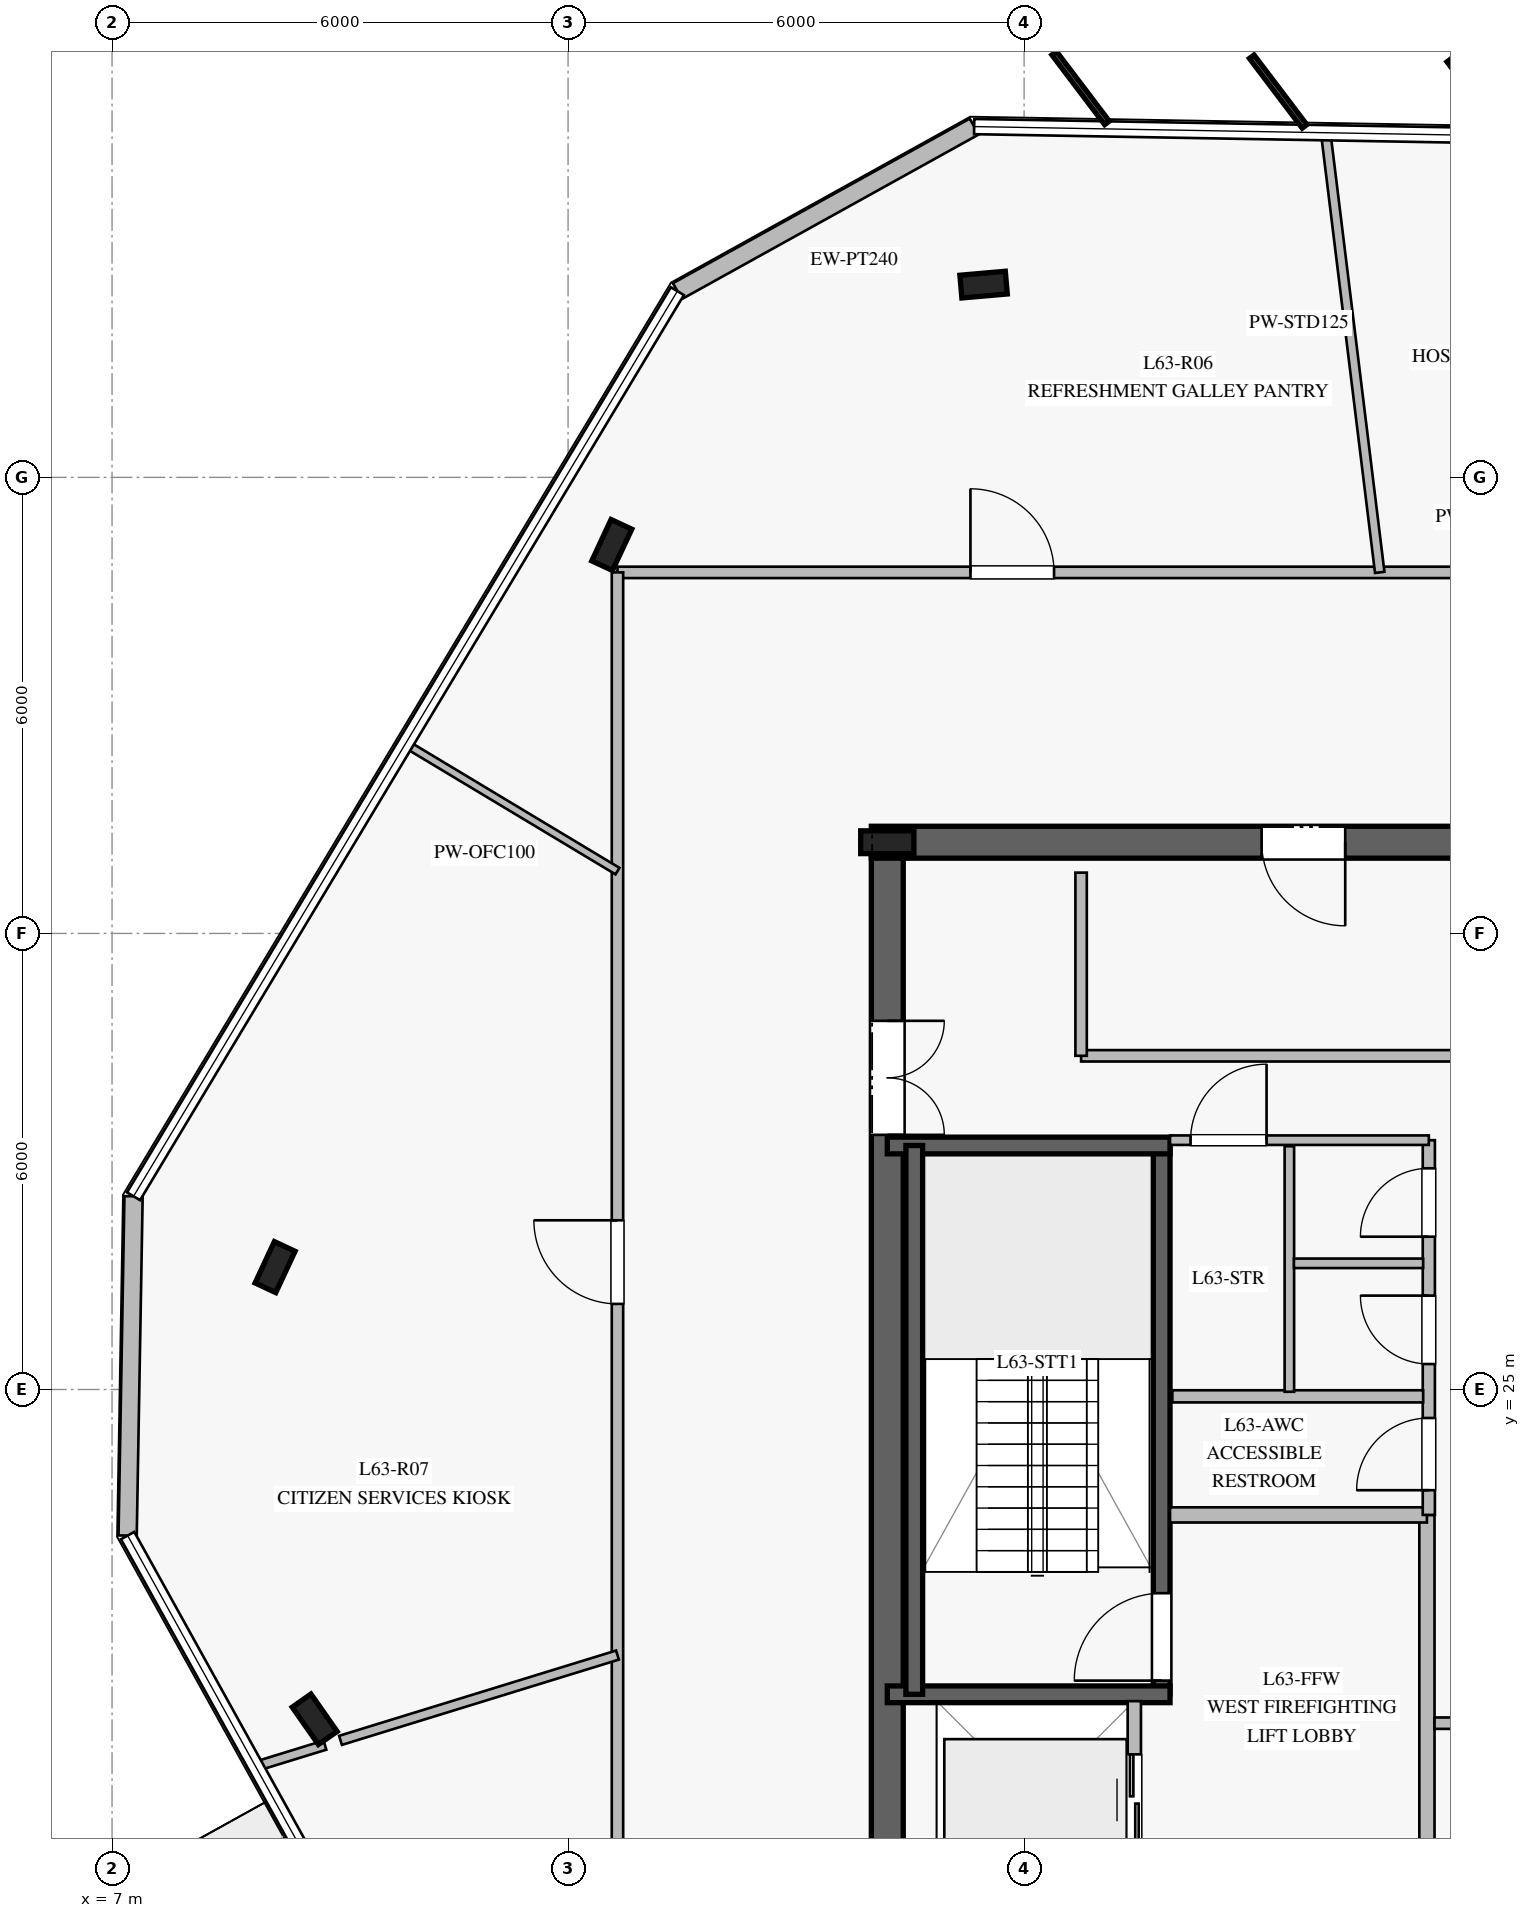
"""IFC4 building model, lengths in metres.
Left out: names, types, materials, properties, quantities, classifications, styles, units other than length and angle.
Written with IfcOpenShell. Run it as: python <this file> out.ifc"""

import sys

from ifc_helpers import new_model, si_unit, direction, frame, frame_2d, origin, origin_2d, place, context, subcontext, project, spatial, rectangle, i_section, extrude, element, fill, save


model = new_model("IFC4")
c1 = context("Model", 3, precision=1e-05, world=origin(), true_north=direction((0.0, 1.0)))
c2 = subcontext(c1, "Body", "Model", "MODEL_VIEW")
j1 = project(units=[si_unit("LENGTHUNIT", "METRE"), si_unit("PLANEANGLEUNIT", "RADIAN")], contexts=[c1])
p1 = place(None, origin())
s1 = spatial("IfcSite", under=j1, at=p1, CompositionType="ELEMENT")
p2 = place(p1, origin())
s2 = spatial("IfcBuilding", under=s1, at=p2, CompositionType="ELEMENT")
p3 = place(p2, frame((0.0, 0.0, 262.2)))
s3 = spatial("IfcBuildingStorey", under=s2, at=p3, CompositionType="ELEMENT", Elevation=262.2)
p4 = place(p3, frame((33.01, 32.2, 0.0), z_axis=(0.0, 0.0, 1.0), x_axis=(-1.0, 0.0, 0.0)))
e1 = element("IfcWall", 1, at=p4, inside=s3, PredefinedType="SHEAR", context=c2, shape_type="SweptSolid", body=[
    extrude(rectangle(XDim=16.02, YDim=0.42, at=frame_2d((8.01, 0.0))), origin(), (0.0, 0.0, 1.0), 3.78),
])
p5 = place(p4, frame((4.96, 0.0, 0.0)))
e2 = element("IfcOpeningElement", 2, at=p5, cuts=e1, PredefinedType="OPENING", context=c2, shape_type="SweptSolid", body=[
    extrude(rectangle(XDim=1.2, YDim=2.25, at=frame_2d((0.6, 1.125))), frame((0.0, 0.22, 0.0), z_axis=(0.0, -1.0, 0.0), x_axis=(1.0, 0.0, 0.0)), (0.0, 0.0, 1.0), 0.44),
])
p6 = place(p4, frame((9.785, 0.0, 0.0)))
e3 = element("IfcOpeningElement", 3, at=p6, cuts=e1, PredefinedType="OPENING", context=c2, shape_type="SweptSolid", body=[
    extrude(rectangle(XDim=1.1, YDim=2.2, at=frame_2d((0.55, 1.1))), frame((0.0, 0.22, 0.0), z_axis=(0.0, -1.0, 0.0), x_axis=(1.0, 0.0, 0.0)), (0.0, 0.0, 1.0), 0.44),
])
p7 = place(p3, frame((17.2, 31.99, 0.0), z_axis=(0.0, 0.0, 1.0), x_axis=(0.0, -1.0, 0.0)))
e4 = element("IfcWall", 4, at=p7, inside=s3, PredefinedType="SHEAR", context=c2, shape_type="SweptSolid", body=[
    extrude(rectangle(XDim=13.98, YDim=0.42, at=frame_2d((6.99, 0.0))), origin(), (0.0, 0.0, 1.0), 3.78),
])
p8 = place(p7, frame((2.14, 0.0, 0.0)))
e5 = element("IfcOpeningElement", 5, at=p8, cuts=e4, PredefinedType="OPENING", context=c2, shape_type="SweptSolid", body=[
    extrude(rectangle(XDim=1.5, YDim=2.2, at=frame_2d((0.75, 1.1))), frame((0.0, 0.22, 0.0), z_axis=(0.0, -1.0, 0.0), x_axis=(1.0, 0.0, 0.0)), (0.0, 0.0, 1.0), 0.44),
])
p9 = place(p3, frame((17.2, 32.2, 0.0), z_axis=(0.0, 0.0, 1.0), x_axis=(1.0, 0.0, 0.0)))
e6 = element("IfcColumn", 6, at=p9, inside=s3, PredefinedType="COLUMN", context=c2, shape_type="SweptSolid", body=[
    extrude(i_section(OverallWidth=0.3, OverallDepth=0.7, WebThickness=0.017, FlangeThickness=0.032, at=origin_2d()), origin(), (0.0, 0.0, 1.0), 4.0),
])
p10 = place(p3, frame((20.81, 20.99, 0.0), z_axis=(0.0, 0.0, 1.0), x_axis=(0.0, 1.0, 0.0)))
e7 = element("IfcWall", 7, at=p10, inside=s3, PredefinedType="SOLIDWALL", context=c2, shape_type="SweptSolid", body=[
    extrude(rectangle(XDim=7.22, YDim=0.22, at=frame_2d((3.61, 0.0))), origin(), (0.0, 0.0, 1.0), 3.78),
])
p11 = place(p10, frame((0.18, 0.0, 0.0)))
e8 = element("IfcOpeningElement", 8, at=p11, cuts=e7, PredefinedType="OPENING", context=c2, shape_type="SweptSolid", body=[
    extrude(rectangle(XDim=1.15, YDim=2.2, at=frame_2d((0.575, 1.1))), frame((0.0, 0.12, 0.0), z_axis=(0.0, -1.0, 0.0), x_axis=(1.0, 0.0, 0.0)), (0.0, 0.0, 1.0), 0.24),
])
for number, where, z_axis, x_axis in (
    (9, (17.2, 20.99, 0.0), (0.0, 0.0, 1.0), (1.0, 0.0, 0.0)),
    (10, (17.2, 28.21, 0.0), (0.0, 0.0, 1.0), (1.0, 0.0, 0.0)),
):
    element("IfcWall", number, at=place(p3, frame(where, z_axis=z_axis, x_axis=x_axis)), inside=s3, PredefinedType="SOLIDWALL", context=c2, shape_type="SweptSolid", body=[
        extrude(rectangle(XDim=3.72, YDim=0.22, at=frame_2d((1.86, 0.0))), origin(), (0.0, 0.0, 1.0), 3.78),
    ])
p12 = place(p3, frame((17.555, 28.21, 0.0), z_axis=(0.0, 0.0, 1.0), x_axis=(0.0, -1.0, 0.0)))
e11 = element("IfcWall", 11, at=p12, inside=s3, PredefinedType="SOLIDWALL", context=c2, shape_type="SweptSolid", body=[
    extrude(rectangle(XDim=7.22, YDim=0.22, at=frame_2d((3.61, 0.0))), origin(), (0.0, 0.0, 1.0), 3.78),
])
for number, where, z_axis, x_axis in (
    (12, (18.467, 39.536, 0.0), (0.0, 0.0, 1.0), (0.996, 0.087, 0.0)),
    (13, (13.575, 36.11, 0.0), (0.0, 0.0, 1.0), (0.423, 0.906, 0.0)),
    (14, (9.145, 26.61, 0.0), (0.0, 0.0, 1.0), (0.423, 0.906, 0.0)),
    (15, (9.666, 20.661, 0.0), (0.0, 0.0, 1.0), (-0.574, 0.819, 0.0)),
):
    element("IfcColumn", number, at=place(p3, frame(where, z_axis=z_axis, x_axis=x_axis)), inside=s3, PredefinedType="COLUMN", context=c2, shape_type="SweptSolid", body=[
        extrude(i_section(OverallWidth=0.3, OverallDepth=0.6, WebThickness=0.015, FlangeThickness=0.03, at=origin_2d()), origin(), (0.0, 0.0, 1.0), 4.0),
    ])
p13 = place(p3, frame((18.343, 41.615, 0.0), z_axis=(0.0, 0.0, 1.0), x_axis=(-0.874577351509, -0.484886023956, 0.0)))
e16 = element("IfcWall", 16, at=p13, inside=s3, PredefinedType="STANDARD", context=c2, shape_type="SweptSolid", body=[
    extrude(rectangle(XDim=4.465, YDim=0.24, at=frame_2d((2.232, 0.0))), origin(), (0.0, 0.0, 1.0), 3.78),
])
p14 = place(p3, frame((7.283, 27.542, 0.0), z_axis=(0.0, 0.0, 1.0), x_axis=(-0.017443339635, -0.999847853377, 0.0)))
e17 = element("IfcWall", 17, at=p14, inside=s3, PredefinedType="STANDARD", context=c2, shape_type="SweptSolid", body=[
    extrude(rectangle(XDim=4.465, YDim=0.24, at=frame_2d((2.232, 0.0))), origin(), (0.0, 0.0, 1.0), 3.78),
])
p15 = place(p3, frame((24.3, 18.2, 0.0), z_axis=(0.0, 0.0, 1.0), x_axis=(0.0, 1.0, 0.0)))
e18 = element("IfcWall", 18, at=p15, inside=s3, PredefinedType="PARTITIONING", context=c2, shape_type="SweptSolid", body=[
    extrude(rectangle(XDim=5.15, YDim=0.2, at=frame_2d((2.575, 0.0))), origin(), (0.0, 0.0, 1.0), 3.78),
])
p16 = place(p3, frame((20.92, 23.35, 0.0), z_axis=(0.0, 0.0, 1.0), x_axis=(1.0, 0.0, 0.0)))
e19 = element("IfcWall", 19, at=p16, inside=s3, PredefinedType="PARTITIONING", context=c2, shape_type="SweptSolid", body=[
    extrude(rectangle(XDim=3.38, YDim=0.2, at=frame_2d((1.69, 0.0))), origin(), (0.0, 0.0, 1.0), 3.78),
])
p17 = place(p3, frame((24.325, 23.35, 0.0), z_axis=(0.0, 0.0, 1.0), x_axis=(0.0, 1.0, 0.0)))
e20 = element("IfcWall", 20, at=p17, inside=s3, PredefinedType="PLUMBINGWALL", context=c2, shape_type="SweptSolid", body=[
    extrude(rectangle(XDim=4.93, YDim=0.16, at=frame_2d((2.465, 0.0))), origin(), (0.0, 0.0, 1.0), 3.78),
])
p18 = place(p17, frame((0.325, 0.0, 0.0)))
e21 = element("IfcOpeningElement", 21, at=p18, cuts=e20, PredefinedType="OPENING", context=c2, shape_type="SweptSolid", body=[
    extrude(rectangle(XDim=0.95, YDim=2.1, at=frame_2d((0.475, 1.05))), frame((0.0, 0.09, 0.0), z_axis=(0.0, -1.0, 0.0), x_axis=(1.0, 0.0, 0.0)), (0.0, 0.0, 1.0), 0.18),
])
p19 = place(p17, frame((1.985, 0.0, 0.0)))
e22 = element("IfcOpeningElement", 22, at=p19, cuts=e20, PredefinedType="OPENING", context=c2, shape_type="SweptSolid", body=[
    extrude(rectangle(XDim=0.9, YDim=2.1, at=frame_2d((0.45, 1.05))), frame((0.0, 0.09, 0.0), z_axis=(0.0, -1.0, 0.0), x_axis=(1.0, 0.0, 0.0)), (0.0, 0.0, 1.0), 0.18),
])
p20 = place(p17, frame((3.66, 0.0, 0.0)))
e23 = element("IfcOpeningElement", 23, at=p20, cuts=e20, PredefinedType="OPENING", context=c2, shape_type="SweptSolid", body=[
    extrude(rectangle(XDim=0.9, YDim=2.1, at=frame_2d((0.45, 1.05))), frame((0.0, 0.09, 0.0), z_axis=(0.0, -1.0, 0.0), x_axis=(1.0, 0.0, 0.0)), (0.0, 0.0, 1.0), 0.18),
])
p21 = place(p3, frame((20.92, 28.28, 0.0), z_axis=(0.0, 0.0, 1.0), x_axis=(1.0, 0.0, 0.0)))
e24 = element("IfcWall", 24, at=p21, inside=s3, PredefinedType="PARTITIONING", context=c2, shape_type="SweptSolid", body=[
    extrude(rectangle(XDim=3.405, YDim=0.125, at=frame_2d((1.703, 0.0))), origin(), (0.0, 0.0, 1.0), 3.78),
])
p22 = place(p21, frame((0.27, 0.0, 0.0)))
e25 = element("IfcOpeningElement", 25, at=p22, cuts=e24, PredefinedType="OPENING", context=c2, shape_type="SweptSolid", body=[
    extrude(rectangle(XDim=1.0, YDim=2.15, at=frame_2d((0.5, 1.075))), frame((0.0, 0.073, 0.0), z_axis=(0.0, -1.0, 0.0), x_axis=(1.0, 0.0, 0.0)), (0.0, 0.0, 1.0), 0.145),
])
p23 = place(p3, frame((20.95, 24.91, 0.0), z_axis=(0.0, 0.0, 1.0), x_axis=(1.0, 0.0, 0.0)))
e26 = element("IfcWall", 26, at=p23, inside=s3, PredefinedType="PLUMBINGWALL", context=c2, shape_type="SweptSolid", body=[
    extrude(rectangle(XDim=3.3, YDim=0.16, at=frame_2d((1.65, 0.0))), origin(), (0.0, 0.0, 1.0), 3.78),
])
p24 = place(p3, frame((22.49, 24.97, 0.0), z_axis=(0.0, 0.0, 1.0), x_axis=(0.0, 1.0, 0.0)))
e27 = element("IfcWall", 27, at=p24, inside=s3, PredefinedType="PARTITIONING", context=c2, shape_type="SweptSolid", body=[
    extrude(rectangle(XDim=3.23, YDim=0.125, at=frame_2d((1.615, 0.0))), origin(), (0.0, 0.0, 1.0), 3.78),
])
p25 = place(p3, frame((22.55, 26.66, 0.0), z_axis=(0.0, 0.0, 1.0), x_axis=(1.0, 0.0, 0.0)))
e28 = element("IfcWall", 28, at=p25, inside=s3, PredefinedType="PARTITIONING", context=c2, shape_type="SweptSolid", body=[
    extrude(rectangle(XDim=1.7, YDim=0.125, at=frame_2d((0.85, 0.0))), origin(), (0.0, 0.0, 1.0), 3.78),
])
p26 = place(p3, frame((24.4, 20.61, 0.0), z_axis=(0.0, 0.0, 1.0), x_axis=(1.0, 0.0, 0.0)))
e29 = element("IfcWall", 29, at=p26, inside=s3, PredefinedType="PARTITIONING", context=c2, shape_type="SweptSolid", body=[
    extrude(rectangle(XDim=5.9, YDim=0.15, at=frame_2d((2.95, 0.0))), origin(), (0.0, 0.0, 1.0), 3.78),
])
p27 = place(p3, frame((19.75, 29.39, 0.0), z_axis=(0.0, 0.0, 1.0), x_axis=(1.0, 0.0, 0.0)))
e30 = element("IfcWall", 30, at=p27, inside=s3, PredefinedType="PARTITIONING", context=c2, shape_type="SweptSolid", body=[
    extrude(rectangle(XDim=5.9, YDim=0.15, at=frame_2d((2.95, 0.0))), origin(), (0.0, 0.0, 1.0), 3.78),
])
p28 = place(p3, frame((19.75, 29.39, 0.0), z_axis=(0.0, 0.0, 1.0), x_axis=(0.0, 1.0, 0.0)))
e31 = element("IfcWall", 31, at=p28, inside=s3, PredefinedType="PARTITIONING", context=c2, shape_type="SweptSolid", body=[
    extrude(rectangle(XDim=2.41, YDim=0.15, at=frame_2d((1.205, 0.0))), origin(), (0.0, 0.0, 1.0), 3.78),
])
p29 = place(p3, frame((20.45, 18.3, 0.0), z_axis=(0.0, 0.0, 1.0), x_axis=(0.0, 1.0, 0.0)))
e32 = element("IfcWall", 32, at=p29, inside=s3, PredefinedType="PARTITIONING", context=c2, shape_type="SweptSolid", body=[
    extrude(rectangle(XDim=2.6, YDim=0.175, at=frame_2d((1.3, 0.0))), origin(), (0.0, 0.0, 1.0), 3.78),
])
p30 = place(p29, frame((0.7, 0.0, 0.0)))
e33 = element("IfcOpeningElement", 33, at=p30, cuts=e32, PredefinedType="OPENING", context=c2, shape_type="SweptSolid", body=[
    extrude(rectangle(XDim=1.2, YDim=2.2, at=frame_2d((0.6, 1.1))), frame((0.0, 0.098, 0.0), z_axis=(0.0, -1.0, 0.0), x_axis=(1.0, 0.0, 0.0)), (0.0, 0.0, 1.0), 0.195),
])
p31 = place(p3, frame((13.65, 35.75, 0.0), z_axis=(0.0, 0.0, 1.0), x_axis=(1.0, 0.0, 0.0)))
e34 = element("IfcWall", 34, at=p31, inside=s3, PredefinedType="PARTITIONING", context=c2, shape_type="SweptSolid", body=[
    extrude(rectangle(XDim=22.7, YDim=0.15, at=frame_2d((11.35, 0.0))), origin(), (0.0, 0.0, 1.0), 3.28),
])
p32 = place(p31, frame((20.55, 0.0, 0.0)))
e35 = element("IfcOpeningElement", 35, at=p32, cuts=e34, PredefinedType="OPENING", context=c2, shape_type="SweptSolid", body=[
    extrude(rectangle(XDim=1.1, YDim=2.2, at=frame_2d((0.55, 1.1))), frame((0.0, 0.085, 0.0), z_axis=(0.0, -1.0, 0.0), x_axis=(1.0, 0.0, 0.0)), (0.0, 0.0, 1.0), 0.17),
])
p33 = place(p31, frame((14.483, 0.0, 0.0)))
e36 = element("IfcOpeningElement", 36, at=p33, cuts=e34, PredefinedType="OPENING", context=c2, shape_type="SweptSolid", body=[
    extrude(rectangle(XDim=1.1, YDim=2.2, at=frame_2d((0.55, 1.1))), frame((0.0, 0.085, 0.0), z_axis=(0.0, -1.0, 0.0), x_axis=(1.0, 0.0, 0.0)), (0.0, 0.0, 1.0), 0.17),
])
p34 = place(p31, frame((4.644, 0.0, 0.0)))
e37 = element("IfcOpeningElement", 37, at=p34, cuts=e34, PredefinedType="OPENING", context=c2, shape_type="SweptSolid", body=[
    extrude(rectangle(XDim=1.1, YDim=2.2, at=frame_2d((0.55, 1.1))), frame((0.0, 0.085, 0.0), z_axis=(0.0, -1.0, 0.0), x_axis=(1.0, 0.0, 0.0)), (0.0, 0.0, 1.0), 0.17),
])
p35 = place(p3, frame((13.65, 14.25, 0.0), z_axis=(0.0, 0.0, 1.0), x_axis=(0.0, 1.0, 0.0)))
e38 = element("IfcWall", 38, at=p35, inside=s3, PredefinedType="PARTITIONING", context=c2, shape_type="SweptSolid", body=[
    extrude(rectangle(XDim=21.5, YDim=0.15, at=frame_2d((10.75, 0.0))), origin(), (0.0, 0.0, 1.0), 3.25),
])
p36 = place(p35, frame((11.876, 0.0, 0.0)))
e39 = element("IfcOpeningElement", 39, at=p36, cuts=e38, PredefinedType="OPENING", context=c2, shape_type="SweptSolid", body=[
    extrude(rectangle(XDim=1.1, YDim=2.2, at=frame_2d((0.55, 1.1))), frame((0.0, 0.085, 0.0), z_axis=(0.0, -1.0, 0.0), x_axis=(1.0, 0.0, 0.0)), (0.0, 0.0, 1.0), 0.17),
])
p37 = place(p3, frame((23.679, 35.75, 0.0), z_axis=(0.0, 0.0, 1.0), x_axis=(-0.12199730689, 0.992530431328, 0.0)))
e40 = element("IfcWall", 40, at=p37, inside=s3, PredefinedType="PARTITIONING", context=c2, shape_type="SweptSolid", body=[
    extrude(rectangle(XDim=5.812, YDim=0.125, at=frame_2d((2.906, 0.0))), origin(), (0.0, 0.0, 1.0), 3.28),
])
p38 = place(p3, frame((13.65, 31.82, 0.0), z_axis=(0.0, 0.0, 1.0), x_axis=(-0.857160152971, 0.515049970545, 0.0)))
e41 = element("IfcWall", 41, at=p38, inside=s3, PredefinedType="MOVABLE", context=c2, shape_type="SweptSolid", body=[
    extrude(rectangle(XDim=3.239, YDim=0.1, at=frame_2d((1.619, 0.0))), origin(), (0.0, 0.0, 1.0), 3.28),
])
p39 = place(p3, frame((13.65, 21.506, 0.0), z_axis=(0.0, 0.0, 1.0), x_axis=(-0.955712527057, -0.294301827427, 0.0)))
e42 = element("IfcWall", 42, at=p39, inside=s3, PredefinedType="PARTITIONING", context=c2, shape_type="SweptSolid", body=[
    extrude(rectangle(XDim=3.813, YDim=0.125, at=frame_2d((1.906, 0.0))), origin(), (0.0, 0.0, 1.0), 3.28),
])
p40 = place(p3, frame((9.801, 20.321, 0.0), z_axis=(0.0, 0.0, 1.0), x_axis=(-0.955739628223, -0.294213804986, 0.0)))
e43 = element("IfcWall", 43, at=p40, inside=s3, PredefinedType="PARTITIONING", context=c2, shape_type="SweptSolid", body=[
    extrude(rectangle(XDim=0.938, YDim=0.125, at=frame_2d((0.469, 0.0))), origin(), (0.0, 0.0, 1.0), 3.28),
])
p41 = place(p11, origin())
e44 = element("IfcDoor", 44, at=p41, inside=s3, OperationType="SINGLE_SWING_LEFT", PredefinedType="DOOR", context=c2, shape_type="SweptSolid", body=[
    extrude(rectangle(XDim=1.15, YDim=2.2, at=frame_2d((0.575, 1.1))), frame((0.0, 0.025, 0.0), z_axis=(0.0, -1.0, 0.0), x_axis=(1.0, 0.0, 0.0)), (0.0, 0.0, 1.0), 0.05),
])
fill(e8, e44)
p42 = place(p8, origin())
e45 = element("IfcDoor", 45, at=p42, inside=s3, OperationType="DOUBLE_DOOR_SINGLE_SWING", PredefinedType="DOOR", context=c2, shape_type="SweptSolid", body=[
    extrude(rectangle(XDim=1.5, YDim=2.2, at=frame_2d((0.75, 1.1))), frame((0.0, 0.025, 0.0), z_axis=(0.0, -1.0, 0.0), x_axis=(1.0, 0.0, 0.0)), (0.0, 0.0, 1.0), 0.05),
])
fill(e5, e45)
p43 = place(p18, origin())
e46 = element("IfcDoor", 46, at=p43, inside=s3, OperationType="SINGLE_SWING_LEFT", PredefinedType="DOOR", context=c2, shape_type="SweptSolid", body=[
    extrude(rectangle(XDim=0.95, YDim=2.1, at=frame_2d((0.475, 1.05))), frame((0.0, 0.025, 0.0), z_axis=(0.0, -1.0, 0.0), x_axis=(1.0, 0.0, 0.0)), (0.0, 0.0, 1.0), 0.05),
])
fill(e21, e46)
p44 = place(p19, origin())
e47 = element("IfcDoor", 47, at=p44, inside=s3, OperationType="SINGLE_SWING_RIGHT", PredefinedType="DOOR", context=c2, shape_type="SweptSolid", body=[
    extrude(rectangle(XDim=0.9, YDim=2.1, at=frame_2d((0.45, 1.05))), frame((0.0, 0.025, 0.0), z_axis=(0.0, -1.0, 0.0), x_axis=(1.0, 0.0, 0.0)), (0.0, 0.0, 1.0), 0.05),
])
fill(e22, e47)
p45 = place(p20, origin())
e48 = element("IfcDoor", 48, at=p45, inside=s3, OperationType="SINGLE_SWING_LEFT", PredefinedType="DOOR", context=c2, shape_type="SweptSolid", body=[
    extrude(rectangle(XDim=0.9, YDim=2.1, at=frame_2d((0.45, 1.05))), frame((0.0, 0.025, 0.0), z_axis=(0.0, -1.0, 0.0), x_axis=(1.0, 0.0, 0.0)), (0.0, 0.0, 1.0), 0.05),
])
fill(e23, e48)
p46 = place(p22, origin())
e49 = element("IfcDoor", 49, at=p46, inside=s3, OperationType="SINGLE_SWING_RIGHT", PredefinedType="DOOR", context=c2, shape_type="SweptSolid", body=[
    extrude(rectangle(XDim=1.0, YDim=2.15, at=frame_2d((0.5, 1.075))), frame((0.0, 0.025, 0.0), z_axis=(0.0, -1.0, 0.0), x_axis=(1.0, 0.0, 0.0)), (0.0, 0.0, 1.0), 0.05),
])
fill(e25, e49)
p47 = place(p6, origin())
e50 = element("IfcDoor", 50, at=p47, inside=s3, OperationType="SINGLE_SWING_LEFT", PredefinedType="DOOR", context=c2, shape_type="SweptSolid", body=[
    extrude(rectangle(XDim=1.1, YDim=2.2, at=frame_2d((0.55, 1.1))), frame((0.0, 0.025, 0.0), z_axis=(0.0, -1.0, 0.0), x_axis=(1.0, 0.0, 0.0)), (0.0, 0.0, 1.0), 0.05),
])
fill(e3, e50)
p48 = place(p30, origin())
e51 = element("IfcDoor", 51, at=p48, inside=s3, OperationType="DOUBLE_DOOR_SLIDING", PredefinedType="DOOR", context=c2, shape_type="SweptSolid", body=[
    extrude(rectangle(XDim=1.2, YDim=2.2, at=frame_2d((0.6, 1.1))), frame((0.0, 0.025, 0.0), z_axis=(0.0, -1.0, 0.0), x_axis=(1.0, 0.0, 0.0)), (0.0, 0.0, 1.0), 0.05),
])
fill(e33, e51)
p49 = place(p34, origin())
e52 = element("IfcDoor", 52, at=p49, inside=s3, OperationType="SINGLE_SWING_LEFT", PredefinedType="DOOR", context=c2, shape_type="SweptSolid", body=[
    extrude(rectangle(XDim=1.1, YDim=2.2, at=frame_2d((0.55, 1.1))), frame((0.0, 0.025, 0.0), z_axis=(0.0, -1.0, 0.0), x_axis=(1.0, 0.0, 0.0)), (0.0, 0.0, 1.0), 0.05),
])
fill(e37, e52)
p50 = place(p36, origin())
e53 = element("IfcDoor", 53, at=p50, inside=s3, OperationType="SINGLE_SWING_RIGHT", PredefinedType="DOOR", context=c2, shape_type="SweptSolid", body=[
    extrude(rectangle(XDim=1.1, YDim=2.2, at=frame_2d((0.55, 1.1))), frame((0.0, 0.025, 0.0), z_axis=(0.0, -1.0, 0.0), x_axis=(1.0, 0.0, 0.0)), (0.0, 0.0, 1.0), 0.05),
])
fill(e39, e53)
save(model, sys.argv[1])
